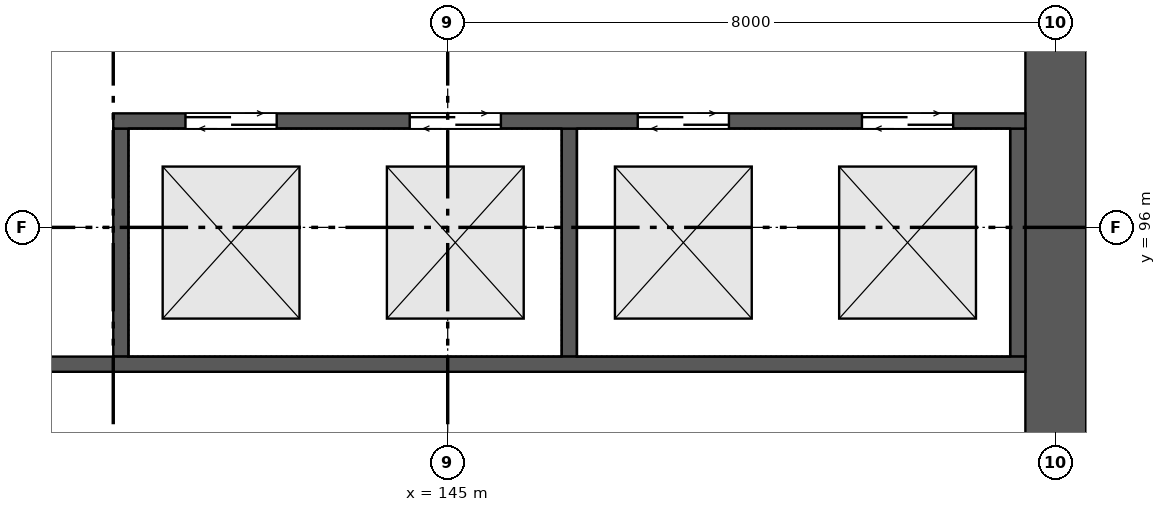
"""IFC4 building model, lengths in metres.
Left out: names, types, materials, properties, quantities, classifications, styles, units other than length and angle.
Written with IfcOpenShell. Run it as: python <this file> out.ifc"""

import sys

from ifc_helpers import new_model, si_unit, direction, frame, frame_2d, origin, place, context, subcontext, project, spatial, rectangle, extrude, element, fill, save


model = new_model("IFC4")
c1 = context("Model", 3, precision=1e-05, world=origin(), true_north=direction((0.0, 1.0)))
c2 = subcontext(c1, "Body", "Model", "MODEL_VIEW")
j1 = project(units=[si_unit("LENGTHUNIT", "METRE"), si_unit("PLANEANGLEUNIT", "RADIAN")], contexts=[c1])
p1 = place(None, origin())
s1 = spatial("IfcSite", under=j1, at=p1, CompositionType="ELEMENT")
p2 = place(p1, origin())
s2 = spatial("IfcBuilding", under=s1, at=p2, CompositionType="ELEMENT")
p3 = place(p2, frame((0.0, 0.0, 47.5)))
s3 = spatial("IfcBuildingStorey", under=s2, at=p3, CompositionType="ELEMENT", Elevation=47.5)
p4 = place(p3, frame((153.0, 88.4, 0.0), z_axis=(0.0, 0.0, 1.0), x_axis=(0.0, 1.0, 0.0)))
e1 = element("IfcWall", 1, at=p4, inside=s3, PredefinedType="SHEAR", context=c2, shape_type="SweptSolid", body=[
    extrude(rectangle(XDim=23.2, YDim=0.8, at=frame_2d((11.6, 0.0))), origin(), (0.0, 0.0, 1.0), 6.0),
])
p5 = place(p4, frame((10.4, 0.0, 0.0)))
e2 = element("IfcOpeningElement", 2, at=p5, cuts=e1, PredefinedType="OPENING", context=c2, shape_type="SweptSolid", body=[
    extrude(rectangle(XDim=2.4, YDim=2.4, at=frame_2d((1.2, 1.2))), frame((0.0, 0.41, 0.0), z_axis=(0.0, -1.0, 0.0), x_axis=(1.0, 0.0, 0.0)), (0.0, 0.0, 1.0), 0.82),
])
for number, where, z_axis, x_axis in (
    (3, (140.7, 94.3, 0.0), (0.0, 0.0, 1.0), (0.0, 1.0, 0.0)),
    (4, (146.6, 94.3, 0.0), (0.0, 0.0, 1.0), (0.0, 1.0, 0.0)),
    (5, (152.5, 94.3, 0.0), (0.0, 0.0, 1.0), (0.0, 1.0, 0.0)),
):
    element("IfcWall", number, at=place(p3, frame(where, z_axis=z_axis, x_axis=x_axis)), inside=s3, PredefinedType="SHEAR", context=c2, shape_type="SweptSolid", body=[
        extrude(rectangle(XDim=3.0, YDim=0.2, at=frame_2d((1.5, 0.0))), origin(), (0.0, 0.0, 1.0), 6.0),
    ])
p6 = place(p3, frame((140.6, 97.4, 0.0), z_axis=(0.0, 0.0, 1.0), x_axis=(1.0, 0.0, 0.0)))
e6 = element("IfcWall", 6, at=p6, inside=s3, PredefinedType="SHEAR", context=c2, shape_type="SweptSolid", body=[
    extrude(rectangle(XDim=12.0, YDim=0.2, at=frame_2d((6.0, 0.0))), origin(), (0.0, 0.0, 1.0), 6.0),
])
p7 = place(p6, frame((0.95, 0.0, 0.0)))
e7 = element("IfcOpeningElement", 7, at=p7, cuts=e6, PredefinedType="OPENING", context=c2, shape_type="SweptSolid", body=[
    extrude(rectangle(XDim=1.2, YDim=2.1, at=frame_2d((0.6, 1.05))), frame((0.0, 0.11, 0.0), z_axis=(0.0, -1.0, 0.0), x_axis=(1.0, 0.0, 0.0)), (0.0, 0.0, 1.0), 0.22),
])
p8 = place(p6, frame((3.9, 0.0, 0.0)))
e8 = element("IfcOpeningElement", 8, at=p8, cuts=e6, PredefinedType="OPENING", context=c2, shape_type="SweptSolid", body=[
    extrude(rectangle(XDim=1.2, YDim=2.1, at=frame_2d((0.6, 1.05))), frame((0.0, 0.11, 0.0), z_axis=(0.0, -1.0, 0.0), x_axis=(1.0, 0.0, 0.0)), (0.0, 0.0, 1.0), 0.22),
])
p9 = place(p6, frame((6.9, 0.0, 0.0)))
e9 = element("IfcOpeningElement", 9, at=p9, cuts=e6, PredefinedType="OPENING", context=c2, shape_type="SweptSolid", body=[
    extrude(rectangle(XDim=1.2, YDim=2.1, at=frame_2d((0.6, 1.05))), frame((0.0, 0.11, 0.0), z_axis=(0.0, -1.0, 0.0), x_axis=(1.0, 0.0, 0.0)), (0.0, 0.0, 1.0), 0.22),
])
p10 = place(p6, frame((9.85, 0.0, 0.0)))
e10 = element("IfcOpeningElement", 10, at=p10, cuts=e6, PredefinedType="OPENING", context=c2, shape_type="SweptSolid", body=[
    extrude(rectangle(XDim=1.2, YDim=2.1, at=frame_2d((0.6, 1.05))), frame((0.0, 0.11, 0.0), z_axis=(0.0, -1.0, 0.0), x_axis=(1.0, 0.0, 0.0)), (0.0, 0.0, 1.0), 0.22),
])
p11 = place(p3, frame((137.3, 94.2, 0.0), z_axis=(0.0, 0.0, 1.0), x_axis=(1.0, 0.0, 0.0)))
e11 = element("IfcWall", 11, at=p11, inside=s3, PredefinedType="SHEAR", context=c2, shape_type="SweptSolid", body=[
    extrude(rectangle(XDim=15.3, YDim=0.2, at=frame_2d((7.65, 0.0))), origin(), (0.0, 0.0, 1.0), 6.0),
])
p12 = place(p11, frame((0.95, 0.0, 0.0)))
e12 = element("IfcOpeningElement", 12, at=p12, cuts=e11, PredefinedType="OPENING", context=c2, shape_type="SweptSolid", body=[
    extrude(rectangle(XDim=1.1, YDim=2.1, at=frame_2d((0.55, 1.05))), frame((0.0, 0.11, 0.0), z_axis=(0.0, -1.0, 0.0), x_axis=(1.0, 0.0, 0.0)), (0.0, 0.0, 1.0), 0.22),
])
p13 = place(p7, origin())
e13 = element("IfcDoor", 13, at=p13, inside=s3, OperationType="DOUBLE_DOOR_SLIDING", PredefinedType="DOOR", context=c2, shape_type="SweptSolid", body=[
    extrude(rectangle(XDim=1.2, YDim=2.1, at=frame_2d((0.6, 1.05))), frame((0.0, 0.025, 0.0), z_axis=(0.0, -1.0, 0.0), x_axis=(1.0, 0.0, 0.0)), (0.0, 0.0, 1.0), 0.05),
])
fill(e7, e13)
p14 = place(p8, origin())
e14 = element("IfcDoor", 14, at=p14, inside=s3, OperationType="DOUBLE_DOOR_SLIDING", PredefinedType="DOOR", context=c2, shape_type="SweptSolid", body=[
    extrude(rectangle(XDim=1.2, YDim=2.1, at=frame_2d((0.6, 1.05))), frame((0.0, 0.025, 0.0), z_axis=(0.0, -1.0, 0.0), x_axis=(1.0, 0.0, 0.0)), (0.0, 0.0, 1.0), 0.05),
])
fill(e8, e14)
p15 = place(p9, origin())
e15 = element("IfcDoor", 15, at=p15, inside=s3, OperationType="DOUBLE_DOOR_SLIDING", PredefinedType="DOOR", context=c2, shape_type="SweptSolid", body=[
    extrude(rectangle(XDim=1.2, YDim=2.1, at=frame_2d((0.6, 1.05))), frame((0.0, 0.025, 0.0), z_axis=(0.0, -1.0, 0.0), x_axis=(1.0, 0.0, 0.0)), (0.0, 0.0, 1.0), 0.05),
])
fill(e9, e15)
p16 = place(p10, origin())
e16 = element("IfcDoor", 16, at=p16, inside=s3, OperationType="DOUBLE_DOOR_SLIDING", PredefinedType="DOOR", context=c2, shape_type="SweptSolid", body=[
    extrude(rectangle(XDim=1.2, YDim=2.1, at=frame_2d((0.6, 1.05))), frame((0.0, 0.025, 0.0), z_axis=(0.0, -1.0, 0.0), x_axis=(1.0, 0.0, 0.0)), (0.0, 0.0, 1.0), 0.05),
])
fill(e10, e16)
save(model, sys.argv[1])
